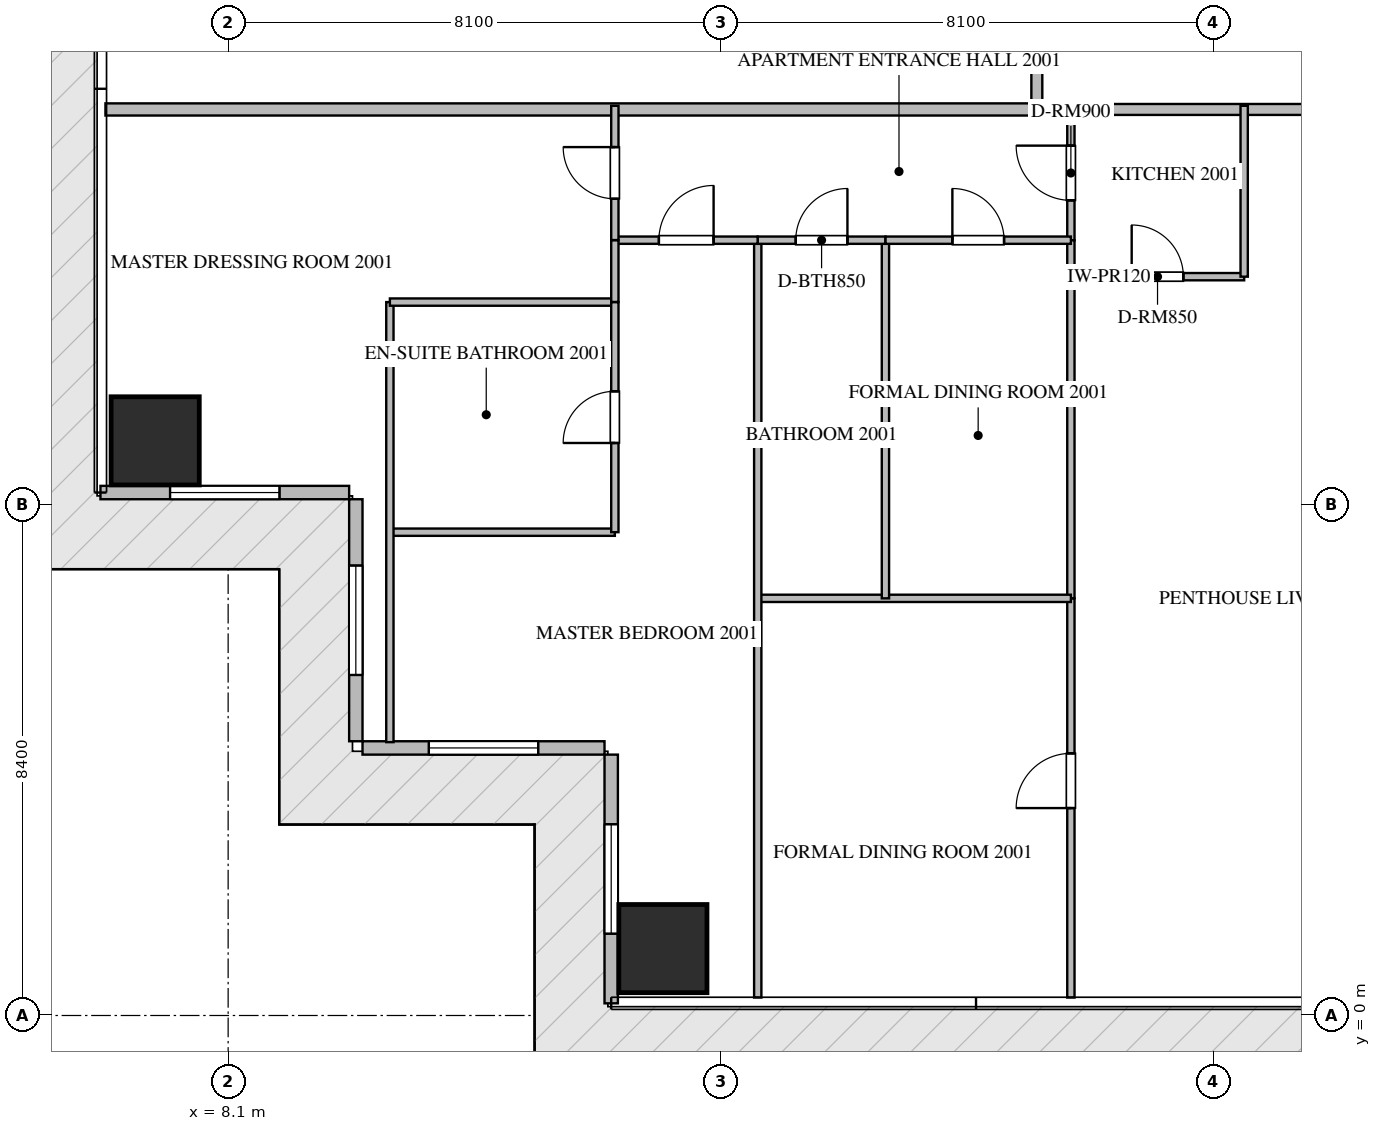
"""IFC4 building model, lengths in metres.
Left out: names, types, materials, properties, quantities, classifications, styles, units other than length and angle.
Written with IfcOpenShell. Run it as: python <this file> out.ifc"""

import sys

from ifc_helpers import new_model, si_unit, direction, frame, frame_2d, origin, origin_2d, place, context, subcontext, project, spatial, rectangle, extrude, source, transform, mapped, element, fill, save


model = new_model("IFC4")
c1 = context("Model", 3, precision=1e-05, world=origin(), true_north=direction((0.0, 1.0)))
c2 = subcontext(c1, "Body", "Model", "MODEL_VIEW")
j1 = project(units=[si_unit("LENGTHUNIT", "METRE"), si_unit("PLANEANGLEUNIT", "RADIAN")], contexts=[c1])
p1 = place(None, origin())
s1 = spatial("IfcSite", under=j1, at=p1, CompositionType="ELEMENT")
p2 = place(p1, origin())
s2 = spatial("IfcBuilding", under=s1, at=p2, CompositionType="ELEMENT")
p3 = place(p2, frame((0.0, 0.0, 82.95)))
s3 = spatial("IfcBuildingStorey", under=s2, at=p3, CompositionType="ELEMENT", Elevation=82.95)
m1 = source(origin(), c2, "Body", "SweptSolid", [
    extrude(rectangle(XDim=1.45, YDim=1.45, at=origin_2d()), origin(), (0.0, 0.0, 1.0), 3.75),
])
for number, where, z_axis, x_axis in (
    (1, (15.25, 1.1, -0.26), (0.0, 0.0, 1.0), (1.0, 0.0, 0.0)),
    (2, (6.9, 9.45, -0.26), (0.0, 0.0, 1.0), (1.0, 0.0, 0.0)),
):
    element("IfcColumn", number, at=place(p3, frame(where, z_axis=z_axis, x_axis=x_axis)), inside=s3, PredefinedType="COLUMN", context=c2, shape_type="MappedRepresentation", body=[
        mapped(m1, transform((0.0, 0.0, 0.0), scale=1.0)),
    ])
p4 = place(p3, frame((6.0, 8.6, 0.0), z_axis=(0.0, 0.0, 1.0), x_axis=(1.0, 0.0, 0.0)))
e3 = element("IfcWall", 3, at=p4, inside=s3, PredefinedType="ELEMENTEDWALL", context=c2, shape_type="SweptSolid", body=[
    extrude(rectangle(XDim=4.09, YDim=0.22, at=frame_2d((2.045, 0.0))), origin(), (0.0, 0.0, 1.0), 3.475),
])
p5 = place(p4, frame((1.145, 0.0, 0.65)))
e4 = element("IfcOpeningElement", 4, at=p5, cuts=e3, PredefinedType="OPENING", context=c2, shape_type="SweptSolid", body=[
    extrude(rectangle(XDim=1.8, YDim=2.1, at=frame_2d((0.9, 1.05))), frame((0.0, 0.12, 0.0), z_axis=(0.0, -1.0, 0.0), x_axis=(1.0, 0.0, 0.0)), (0.0, 0.0, 1.0), 0.24),
])
p6 = place(p3, frame((10.2, 8.49, 0.0), z_axis=(0.0, 0.0, 1.0), x_axis=(0.0, -1.0, 0.0)))
e5 = element("IfcWall", 5, at=p6, inside=s3, PredefinedType="ELEMENTEDWALL", context=c2, shape_type="SweptSolid", body=[
    extrude(rectangle(XDim=3.98, YDim=0.22, at=frame_2d((1.99, 0.0))), origin(), (0.0, 0.0, 1.0), 3.475),
])
p7 = place(p6, frame((1.09, 0.0, 0.65)))
e6 = element("IfcOpeningElement", 6, at=p7, cuts=e5, PredefinedType="OPENING", context=c2, shape_type="SweptSolid", body=[
    extrude(rectangle(XDim=1.8, YDim=2.1, at=frame_2d((0.9, 1.05))), frame((0.0, 0.12, 0.0), z_axis=(0.0, -1.0, 0.0), x_axis=(1.0, 0.0, 0.0)), (0.0, 0.0, 1.0), 0.24),
])
p8 = place(p3, frame((10.31, 4.4, 0.0), z_axis=(0.0, 0.0, 1.0), x_axis=(1.0, 0.0, 0.0)))
e7 = element("IfcWall", 7, at=p8, inside=s3, PredefinedType="ELEMENTEDWALL", context=c2, shape_type="SweptSolid", body=[
    extrude(rectangle(XDim=3.98, YDim=0.22, at=frame_2d((1.99, 0.0))), origin(), (0.0, 0.0, 1.0), 3.475),
])
p9 = place(p8, frame((1.09, 0.0, 0.65)))
e8 = element("IfcOpeningElement", 8, at=p9, cuts=e7, PredefinedType="OPENING", context=c2, shape_type="SweptSolid", body=[
    extrude(rectangle(XDim=1.8, YDim=2.1, at=frame_2d((0.9, 1.05))), frame((0.0, 0.12, 0.0), z_axis=(0.0, -1.0, 0.0), x_axis=(1.0, 0.0, 0.0)), (0.0, 0.0, 1.0), 0.24),
])
p10 = place(p3, frame((14.4, 4.29, 0.0), z_axis=(0.0, 0.0, 1.0), x_axis=(0.0, -1.0, 0.0)))
e9 = element("IfcWall", 9, at=p10, inside=s3, PredefinedType="ELEMENTEDWALL", context=c2, shape_type="SweptSolid", body=[
    extrude(rectangle(XDim=4.09, YDim=0.22, at=frame_2d((2.045, 0.0))), origin(), (0.0, 0.0, 1.0), 3.475),
])
p11 = place(p10, frame((1.145, 0.0, 0.65)))
e10 = element("IfcOpeningElement", 10, at=p11, cuts=e9, PredefinedType="OPENING", context=c2, shape_type="SweptSolid", body=[
    extrude(rectangle(XDim=1.8, YDim=2.1, at=frame_2d((0.9, 1.05))), frame((0.0, 0.12, 0.0), z_axis=(0.0, -1.0, 0.0), x_axis=(1.0, 0.0, 0.0)), (0.0, 0.0, 1.0), 0.24),
])
p12 = place(p3, frame((6.082, 14.9, 0.0), z_axis=(0.0, 0.0, 1.0), x_axis=(1.0, 0.0, 0.0)))
e11 = element("IfcWall", 11, at=p12, inside=s3, PredefinedType="PARTITIONING", context=c2, shape_type="SweptSolid", body=[
    extrude(rectangle(XDim=15.318, YDim=0.2, at=frame_2d((7.659, 0.0))), origin(), (0.0, 0.0, 1.0), 3.49),
])
p13 = place(p3, frame((21.402, 14.9, 0.0), z_axis=(0.0, 0.0, 1.0), x_axis=(1.0, 0.0, 0.0)))
e12 = element("IfcWall", 12, at=p13, inside=s3, PredefinedType="PARTITIONING", context=c2, shape_type="SweptSolid", body=[
    extrude(rectangle(XDim=21.996, YDim=0.18, at=frame_2d((10.998, 0.0))), origin(), (0.0, 0.0, 1.0), 3.49),
])
p14 = place(p13, frame((5.774, 0.0, 0.0)))
e13 = element("IfcOpeningElement", 13, at=p14, cuts=e12, PredefinedType="OPENING", context=c2, shape_type="SweptSolid", body=[
    extrude(rectangle(XDim=1.0, YDim=2.15, at=frame_2d((0.5, 1.075))), frame((0.0, 0.1, 0.0), z_axis=(0.0, -1.0, 0.0), x_axis=(1.0, 0.0, 0.0)), (0.0, 0.0, 1.0), 0.2),
])
p15 = place(p13, frame((16.272, 0.0, 0.0)))
e14 = element("IfcOpeningElement", 14, at=p15, cuts=e12, PredefinedType="OPENING", context=c2, shape_type="SweptSolid", body=[
    extrude(rectangle(XDim=1.0, YDim=2.15, at=frame_2d((0.5, 1.075))), frame((0.0, 0.1, 0.0), z_axis=(0.0, -1.0, 0.0), x_axis=(1.0, 0.0, 0.0)), (0.0, 0.0, 1.0), 0.2),
])
p16 = place(p3, frame((21.4, 14.9, 0.0), z_axis=(0.0, 0.0, 1.0), x_axis=(0.0, 1.0, 0.0)))
e15 = element("IfcWall", 15, at=p16, inside=s3, PredefinedType="PARTITIONING", context=c2, shape_type="SweptSolid", body=[
    extrude(rectangle(XDim=20.6, YDim=0.18, at=frame_2d((10.3, 0.0))), origin(), (0.0, 0.0, 1.0), 3.49),
])
p17 = place(p16, frame((1.96, 0.0, 0.0)))
e16 = element("IfcOpeningElement", 16, at=p17, cuts=e15, PredefinedType="OPENING", context=c2, shape_type="SweptSolid", body=[
    extrude(rectangle(XDim=1.0, YDim=2.15, at=frame_2d((0.5, 1.075))), frame((0.0, 0.1, 0.0), z_axis=(0.0, -1.0, 0.0), x_axis=(1.0, 0.0, 0.0)), (0.0, 0.0, 1.0), 0.2),
])
p18 = place(p3, frame((21.96, 12.15, 0.0), z_axis=(0.0, 0.0, 1.0), x_axis=(1.0, 0.0, 0.0)))
e17 = element("IfcWall", 17, at=p18, inside=s3, PredefinedType="PARTITIONING", context=c2, shape_type="SweptSolid", body=[
    extrude(rectangle(XDim=2.85, YDim=0.12, at=frame_2d((1.425, 0.0))), origin(), (0.0, 0.0, 1.0), 3.49),
])
p19 = place(p18, frame((1.0, 0.0, 0.0)))
e18 = element("IfcOpeningElement", 18, at=p19, cuts=e17, PredefinedType="OPENING", context=c2, shape_type="SweptSolid", body=[
    extrude(rectangle(XDim=0.85, YDim=2.1, at=frame_2d((0.425, 1.05))), frame((0.0, 0.07, 0.0), z_axis=(0.0, -1.0, 0.0), x_axis=(1.0, 0.0, 0.0)), (0.0, 0.0, 1.0), 0.14),
])
p20 = place(p3, frame((24.81, 12.15, 0.0), z_axis=(0.0, 0.0, 1.0), x_axis=(0.0, 1.0, 0.0)))
e19 = element("IfcWall", 19, at=p20, inside=s3, PredefinedType="PARTITIONING", context=c2, shape_type="SweptSolid", body=[
    extrude(rectangle(XDim=2.81, YDim=0.12, at=frame_2d((1.405, 0.0))), origin(), (0.0, 0.0, 1.0), 3.49),
])
p21 = place(p3, frame((21.96, 12.75, 0.0), z_axis=(0.0, 0.0, 1.0), x_axis=(0.0, 1.0, 0.0)))
e20 = element("IfcWall", 20, at=p21, inside=s3, PredefinedType="PARTITIONING", context=c2, shape_type="SweptSolid", body=[
    extrude(rectangle(XDim=2.21, YDim=0.12, at=frame_2d((1.105, 0.0))), origin(), (0.0, 0.0, 1.0), 3.49),
])
p22 = place(p21, frame((0.655, 0.0, 0.0)))
e21 = element("IfcOpeningElement", 21, at=p22, cuts=e20, PredefinedType="OPENING", context=c2, shape_type="SweptSolid", body=[
    extrude(rectangle(XDim=0.9, YDim=2.1, at=frame_2d((0.45, 1.05))), frame((0.0, 0.07, 0.0), z_axis=(0.0, -1.0, 0.0), x_axis=(1.0, 0.0, 0.0)), (0.0, 0.0, 1.0), 0.14),
])
p23 = place(p3, frame((21.96, 0.295, 0.0), z_axis=(0.0, 0.0, 1.0), x_axis=(0.0, 1.0, 0.0)))
e22 = element("IfcWall", 22, at=p23, inside=s3, PredefinedType="PARTITIONING", context=c2, shape_type="SweptSolid", body=[
    extrude(rectangle(XDim=6.565, YDim=0.12, at=frame_2d((3.283, 0.0))), origin(), (0.0, 0.0, 1.0), 3.49),
])
p24 = place(p23, frame((3.116, 0.0, 0.0)))
e23 = element("IfcOpeningElement", 23, at=p24, cuts=e22, PredefinedType="OPENING", context=c2, shape_type="SweptSolid", body=[
    extrude(rectangle(XDim=0.9, YDim=2.1, at=frame_2d((0.45, 1.05))), frame((0.0, 0.07, 0.0), z_axis=(0.0, -1.0, 0.0), x_axis=(1.0, 0.0, 0.0)), (0.0, 0.0, 1.0), 0.14),
])
p25 = place(p3, frame((21.96, 6.862, 0.0), z_axis=(0.0, 0.0, 1.0), x_axis=(0.0, 1.0, 0.0)))
e24 = element("IfcWall", 24, at=p25, inside=s3, PredefinedType="PARTITIONING", context=c2, shape_type="SweptSolid", body=[
    extrude(rectangle(XDim=5.886, YDim=0.12, at=frame_2d((2.943, 0.0))), origin(), (0.0, 0.0, 1.0), 3.49),
])
p26 = place(p3, frame((16.81, 6.86, 0.0), z_axis=(0.0, 0.0, 1.0), x_axis=(1.0, 0.0, 0.0)))
e25 = element("IfcWall", 25, at=p26, inside=s3, PredefinedType="PARTITIONING", context=c2, shape_type="SweptSolid", body=[
    extrude(rectangle(XDim=5.15, YDim=0.12, at=frame_2d((2.575, 0.0))), origin(), (0.0, 0.0, 1.0), 3.49),
])
p27 = place(p3, frame((16.81, 0.295, 0.0), z_axis=(0.0, 0.0, 1.0), x_axis=(0.0, 1.0, 0.0)))
e26 = element("IfcWall", 26, at=p27, inside=s3, PredefinedType="PARTITIONING", context=c2, shape_type="SweptSolid", body=[
    extrude(rectangle(XDim=12.455, YDim=0.12, at=frame_2d((6.228, 0.0))), origin(), (0.0, 0.0, 1.0), 3.49),
])
p28 = place(p3, frame((18.91, 6.86, 0.0), z_axis=(0.0, 0.0, 1.0), x_axis=(0.0, 1.0, 0.0)))
e27 = element("IfcWall", 27, at=p28, inside=s3, PredefinedType="PARTITIONING", context=c2, shape_type="SweptSolid", body=[
    extrude(rectangle(XDim=5.89, YDim=0.12, at=frame_2d((2.945, 0.0))), origin(), (0.0, 0.0, 1.0), 3.49),
])
p29 = place(p3, frame((16.81, 12.75, 0.0), z_axis=(0.0, 0.0, 1.0), x_axis=(1.0, 0.0, 0.0)))
e28 = element("IfcWall", 28, at=p29, inside=s3, PredefinedType="PARTITIONING", context=c2, shape_type="SweptSolid", body=[
    extrude(rectangle(XDim=2.1, YDim=0.12, at=frame_2d((1.05, 0.0))), origin(), (0.0, 0.0, 1.0), 3.49),
])
p30 = place(p29, frame((0.625, 0.0, 0.0)))
e29 = element("IfcOpeningElement", 29, at=p30, cuts=e28, PredefinedType="OPENING", context=c2, shape_type="SweptSolid", body=[
    extrude(rectangle(XDim=0.85, YDim=2.1, at=frame_2d((0.425, 1.05))), frame((0.0, 0.07, 0.0), z_axis=(0.0, -1.0, 0.0), x_axis=(1.0, 0.0, 0.0)), (0.0, 0.0, 1.0), 0.14),
])
p31 = place(p3, frame((18.912, 12.75, 0.0), z_axis=(0.0, 0.0, 1.0), x_axis=(1.0, 0.0, 0.0)))
e30 = element("IfcWall", 30, at=p31, inside=s3, PredefinedType="PARTITIONING", context=c2, shape_type="SweptSolid", body=[
    extrude(rectangle(XDim=3.048, YDim=0.12, at=frame_2d((1.524, 0.0))), origin(), (0.0, 0.0, 1.0), 3.49),
])
p32 = place(p31, frame((1.099, 0.0, 0.0)))
e31 = element("IfcOpeningElement", 31, at=p32, cuts=e30, PredefinedType="OPENING", context=c2, shape_type="SweptSolid", body=[
    extrude(rectangle(XDim=0.85, YDim=2.1, at=frame_2d((0.425, 1.05))), frame((0.0, 0.07, 0.0), z_axis=(0.0, -1.0, 0.0), x_axis=(1.0, 0.0, 0.0)), (0.0, 0.0, 1.0), 0.14),
])
p33 = place(p3, frame((14.46, 12.75, 0.0), z_axis=(0.0, 0.0, 1.0), x_axis=(1.0, 0.0, 0.0)))
e32 = element("IfcWall", 32, at=p33, inside=s3, PredefinedType="PARTITIONING", context=c2, shape_type="SweptSolid", body=[
    extrude(rectangle(XDim=2.348, YDim=0.12, at=frame_2d((1.174, 0.0))), origin(), (0.0, 0.0, 1.0), 3.49),
])
p34 = place(p33, frame((0.724, 0.0, 0.0)))
e33 = element("IfcOpeningElement", 33, at=p34, cuts=e32, PredefinedType="OPENING", context=c2, shape_type="SweptSolid", body=[
    extrude(rectangle(XDim=0.9, YDim=2.1, at=frame_2d((0.45, 1.05))), frame((0.0, 0.07, 0.0), z_axis=(0.0, -1.0, 0.0), x_axis=(1.0, 0.0, 0.0)), (0.0, 0.0, 1.0), 0.14),
])
p35 = place(p3, frame((10.76, 7.948, 0.0), z_axis=(0.0, 0.0, 1.0), x_axis=(1.0, 0.0, 0.0)))
e34 = element("IfcWall", 34, at=p35, inside=s3, PredefinedType="PARTITIONING", context=c2, shape_type="SweptSolid", body=[
    extrude(rectangle(XDim=3.7, YDim=0.12, at=frame_2d((1.85, 0.0))), origin(), (0.0, 0.0, 1.0), 3.49),
])
p36 = place(p3, frame((10.76, 4.495, 0.0), z_axis=(0.0, 0.0, 1.0), x_axis=(0.0, 1.0, 0.0)))
e35 = element("IfcWall", 35, at=p36, inside=s3, PredefinedType="PARTITIONING", context=c2, shape_type="SweptSolid", body=[
    extrude(rectangle(XDim=7.237, YDim=0.12, at=frame_2d((3.618, 0.0))), origin(), (0.0, 0.0, 1.0), 3.49),
])
p37 = place(p3, frame((10.76, 11.732, 0.0), z_axis=(0.0, 0.0, 1.0), x_axis=(1.0, 0.0, 0.0)))
e36 = element("IfcWall", 36, at=p37, inside=s3, PredefinedType="PARTITIONING", context=c2, shape_type="SweptSolid", body=[
    extrude(rectangle(XDim=3.7, YDim=0.12, at=frame_2d((1.85, 0.0))), origin(), (0.0, 0.0, 1.0), 3.49),
])
p38 = place(p3, frame((14.46, 7.948, 0.0), z_axis=(0.0, 0.0, 1.0), x_axis=(0.0, 1.0, 0.0)))
e37 = element("IfcWall", 37, at=p38, inside=s3, PredefinedType="PARTITIONING", context=c2, shape_type="SweptSolid", body=[
    extrude(rectangle(XDim=3.784, YDim=0.12, at=frame_2d((1.892, 0.0))), origin(), (0.0, 0.0, 1.0), 3.49),
])
p39 = place(p38, frame((1.467, 0.0, 0.0)))
e38 = element("IfcOpeningElement", 38, at=p39, cuts=e37, PredefinedType="OPENING", context=c2, shape_type="SweptSolid", body=[
    extrude(rectangle(XDim=0.85, YDim=2.1, at=frame_2d((0.425, 1.05))), frame((0.0, 0.07, 0.0), z_axis=(0.0, -1.0, 0.0), x_axis=(1.0, 0.0, 0.0)), (0.0, 0.0, 1.0), 0.14),
])
p40 = place(p3, frame((14.46, 11.734, 0.0), z_axis=(0.0, 0.0, 1.0), x_axis=(0.0, 1.0, 0.0)))
e39 = element("IfcWall", 39, at=p40, inside=s3, PredefinedType="PARTITIONING", context=c2, shape_type="SweptSolid", body=[
    extrude(rectangle(XDim=1.016, YDim=0.12, at=frame_2d((0.508, 0.0))), origin(), (0.0, 0.0, 1.0), 3.49),
])
p41 = place(p3, frame((14.46, 12.752, 0.0), z_axis=(0.0, 0.0, 1.0), x_axis=(0.0, 1.0, 0.0)))
e40 = element("IfcWall", 40, at=p41, inside=s3, PredefinedType="PARTITIONING", context=c2, shape_type="SweptSolid", body=[
    extrude(rectangle(XDim=2.208, YDim=0.12, at=frame_2d((1.104, 0.0))), origin(), (0.0, 0.0, 1.0), 3.49),
])
p42 = place(p41, frame((0.679, 0.0, 0.0)))
e41 = element("IfcOpeningElement", 41, at=p42, cuts=e40, PredefinedType="OPENING", context=c2, shape_type="SweptSolid", body=[
    extrude(rectangle(XDim=0.85, YDim=2.1, at=frame_2d((0.425, 1.05))), frame((0.0, 0.07, 0.0), z_axis=(0.0, -1.0, 0.0), x_axis=(1.0, 0.0, 0.0)), (0.0, 0.0, 1.0), 0.14),
])
m2 = source(origin(), c2, "Body", "SweptSolid", [
    extrude(rectangle(XDim=1.8, YDim=2.1, at=frame_2d((0.9, 1.05))), frame((0.0, 0.03, 0.0), z_axis=(0.0, -1.0, 0.0), x_axis=(1.0, 0.0, 0.0)), (0.0, 0.0, 1.0), 0.06),
])
p43 = place(p5, origin())
e42 = element("IfcWindow", 42, at=p43, inside=s3, PartitioningType="SINGLE_PANEL", PredefinedType="WINDOW", context=c2, shape_type="MappedRepresentation", body=[
    mapped(m2, transform((0.0, 0.0, 0.0), scale=1.0)),
])
fill(e4, e42)
p44 = place(p7, origin())
e43 = element("IfcWindow", 43, at=p44, inside=s3, PartitioningType="SINGLE_PANEL", PredefinedType="WINDOW", context=c2, shape_type="MappedRepresentation", body=[
    mapped(m2, transform((0.0, 0.0, 0.0), scale=1.0)),
])
fill(e6, e43)
p45 = place(p9, origin())
e44 = element("IfcWindow", 44, at=p45, inside=s3, PartitioningType="SINGLE_PANEL", PredefinedType="WINDOW", context=c2, shape_type="MappedRepresentation", body=[
    mapped(m2, transform((0.0, 0.0, 0.0), scale=1.0)),
])
fill(e8, e44)
p46 = place(p11, origin())
e45 = element("IfcWindow", 45, at=p46, inside=s3, PartitioningType="SINGLE_PANEL", PredefinedType="WINDOW", context=c2, shape_type="MappedRepresentation", body=[
    mapped(m2, transform((0.0, 0.0, 0.0), scale=1.0)),
])
fill(e10, e45)
m3 = source(origin(), c2, "Body", "SweptSolid", [
    extrude(rectangle(XDim=0.85, YDim=2.1, at=frame_2d((0.425, 1.05))), frame((0.0, 0.025, 0.0), z_axis=(0.0, -1.0, 0.0), x_axis=(1.0, 0.0, 0.0)), (0.0, 0.0, 1.0), 0.05),
])
p47 = place(p19, origin())
e46 = element("IfcDoor", 46, at=p47, inside=s3, OperationType="SINGLE_SWING_LEFT", PredefinedType="DOOR", context=c2, shape_type="MappedRepresentation", body=[
    mapped(m3, transform((0.0, 0.0, 0.0), scale=1.0)),
])
fill(e18, e46)
m4 = source(origin(), c2, "Body", "SweptSolid", [
    extrude(rectangle(XDim=0.9, YDim=2.1, at=frame_2d((0.45, 1.05))), frame((0.0, 0.025, 0.0), z_axis=(0.0, -1.0, 0.0), x_axis=(1.0, 0.0, 0.0)), (0.0, 0.0, 1.0), 0.05),
])
p48 = place(p22, origin())
e47 = element("IfcDoor", 47, at=p48, inside=s3, OperationType="SINGLE_SWING_RIGHT", PredefinedType="DOOR", context=c2, shape_type="MappedRepresentation", body=[
    mapped(m4, transform((0.0, 0.0, 0.0), scale=1.0)),
])
fill(e21, e47)
p49 = place(p24, origin())
e48 = element("IfcDoor", 48, at=p49, inside=s3, OperationType="SINGLE_SWING_LEFT", PredefinedType="DOOR", context=c2, shape_type="MappedRepresentation", body=[
    mapped(m4, transform((0.0, 0.0, 0.0), scale=1.0)),
])
fill(e23, e48)
p50 = place(p30, origin())
e49 = element("IfcDoor", 49, at=p50, inside=s3, OperationType="SINGLE_SWING_RIGHT", PredefinedType="DOOR", context=c2, shape_type="MappedRepresentation", body=[
    mapped(m3, transform((0.0, 0.0, 0.0), scale=1.0)),
])
fill(e29, e49)
p51 = place(p32, origin())
e50 = element("IfcDoor", 50, at=p51, inside=s3, OperationType="SINGLE_SWING_LEFT", PredefinedType="DOOR", context=c2, shape_type="MappedRepresentation", body=[
    mapped(m3, transform((0.0, 0.0, 0.0), scale=1.0)),
])
fill(e31, e50)
p52 = place(p34, origin())
e51 = element("IfcDoor", 51, at=p52, inside=s3, OperationType="SINGLE_SWING_RIGHT", PredefinedType="DOOR", context=c2, shape_type="MappedRepresentation", body=[
    mapped(m4, transform((0.0, 0.0, 0.0), scale=1.0)),
])
fill(e33, e51)
p53 = place(p39, origin())
e52 = element("IfcDoor", 52, at=p53, inside=s3, OperationType="SINGLE_SWING_LEFT", PredefinedType="DOOR", context=c2, shape_type="MappedRepresentation", body=[
    mapped(m3, transform((0.0, 0.0, 0.0), scale=1.0)),
])
fill(e38, e52)
p54 = place(p42, origin())
e53 = element("IfcDoor", 53, at=p54, inside=s3, OperationType="SINGLE_SWING_RIGHT", PredefinedType="DOOR", context=c2, shape_type="MappedRepresentation", body=[
    mapped(m3, transform((0.0, 0.0, 0.0), scale=1.0)),
])
fill(e41, e53)
save(model, sys.argv[1])
